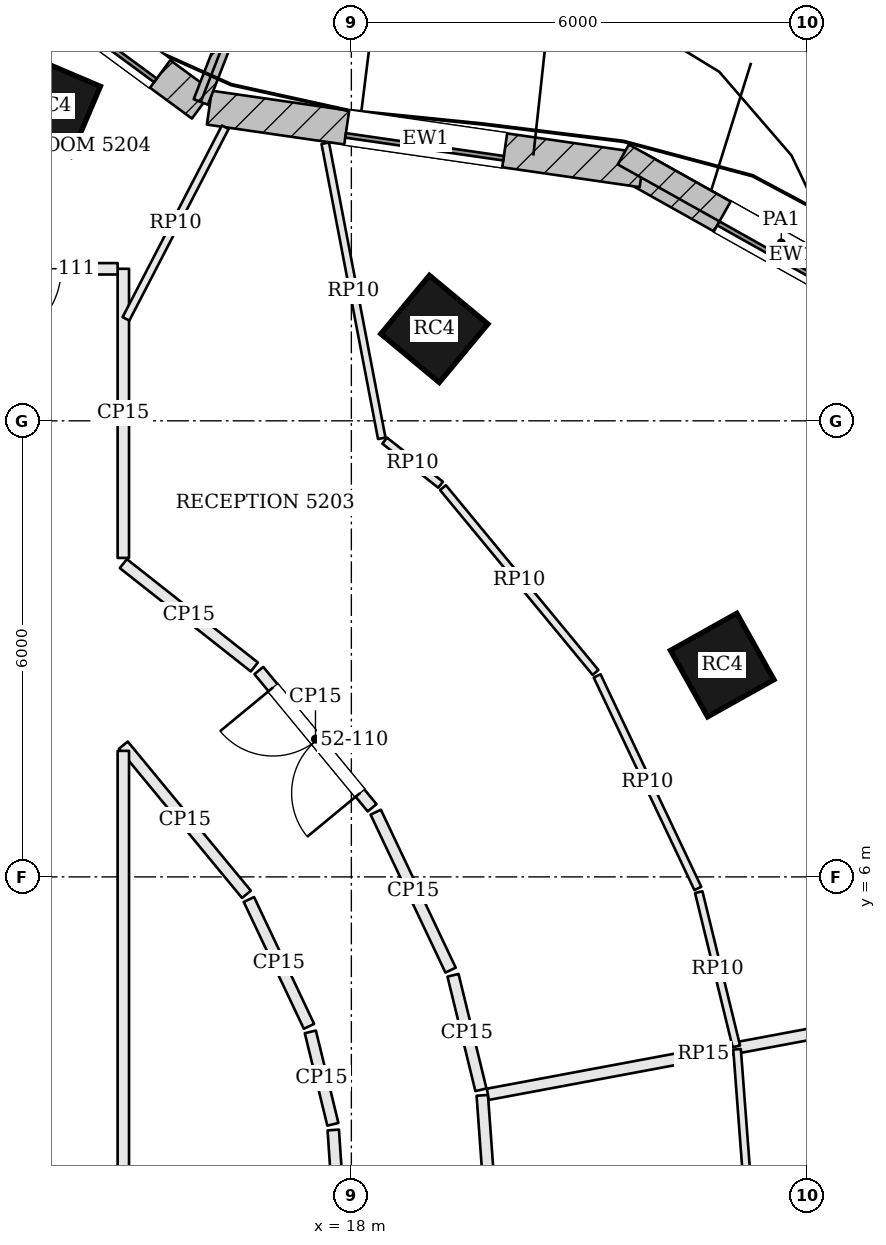
"""IFC4 building model, lengths in metres.
Left out: names, types, materials, properties, quantities, classifications, styles, units other than length and angle.
Written with IfcOpenShell. Run it as: python <this file> out.ifc"""

import sys

from ifc_helpers import new_model, si_unit, direction, frame, frame_2d, origin, origin_2d, place, context, subcontext, project, spatial, rectangle, extrude, element, fill, save


model = new_model("IFC4")
c1 = context("Model", 3, precision=1e-05, world=origin(), true_north=direction((0.0, 1.0)))
c2 = subcontext(c1, "Body", "Model", "MODEL_VIEW")
j1 = project(units=[si_unit("LENGTHUNIT", "METRE"), si_unit("PLANEANGLEUNIT", "RADIAN")], contexts=[c1])
p1 = place(None, origin())
s1 = spatial("IfcSite", under=j1, at=p1, CompositionType="ELEMENT")
p2 = place(p1, origin())
s2 = spatial("IfcBuilding", under=s1, at=p2, CompositionType="ELEMENT")
p3 = place(p2, frame((0.0, 0.0, 213.0)))
s3 = spatial("IfcBuildingStorey", under=s2, at=p3, CompositionType="ELEMENT", Elevation=213.0)
for number, where, z_axis, x_axis in (
    (1, (22.879, 8.787, 0.0), (0.0, 0.0, 1.0), (-0.489, 0.873, 0.0)),
    (2, (19.092, 13.209, 0.0), (0.0, 0.0, 1.0), (-0.769, 0.639, 0.0)),
    (3, (14.042, 16.136, 0.0), (0.0, 0.0, 1.0), (-0.92, 0.392, 0.0)),
):
    element("IfcColumn", number, at=place(p3, frame(where, z_axis=z_axis, x_axis=x_axis)), inside=s3, PredefinedType="COLUMN", context=c2, shape_type="SweptSolid", body=[
        extrude(rectangle(XDim=1.0, YDim=1.0, at=origin_2d()), origin(), (0.0, 0.0, 1.0), 3.9),
    ])
p4 = place(p3, frame((25.844, 13.028, 0.0), z_axis=(0.0, 0.0, 1.0), x_axis=(-0.872346398261, 0.488888291373, 0.0)))
e4 = element("IfcWall", 4, at=p4, inside=s3, PredefinedType="SOLIDWALL", context=c2, shape_type="SweptSolid", body=[
    extrude(rectangle(XDim=4.696, YDim=0.45, at=frame_2d((2.348, 0.0))), origin(), (0.0, 0.0, 1.0), 3.6),
])
p5 = place(p4, frame((1.298, 0.0, 0.9)))
e5 = element("IfcOpeningElement", 5, at=p5, cuts=e4, PredefinedType="OPENING", context=c2, shape_type="SweptSolid", body=[
    extrude(rectangle(XDim=2.1, YDim=1.8, at=frame_2d((1.05, 0.9))), frame((0.0, 0.235, 0.0), z_axis=(0.0, -1.0, 0.0), x_axis=(1.0, 0.0, 0.0)), (0.0, 0.0, 1.0), 0.47),
])
p6 = place(p3, frame((21.825, 15.297, 0.0), z_axis=(0.0, 0.0, 1.0), x_axis=(-0.98971474215, 0.143054986527, 0.0)))
e6 = element("IfcWall", 6, at=p6, inside=s3, PredefinedType="SOLIDWALL", context=c2, shape_type="SweptSolid", body=[
    extrude(rectangle(XDim=5.753, YDim=0.45, at=frame_2d((2.876, 0.0))), origin(), (0.0, 0.0, 1.0), 3.6),
])
p7 = place(p6, frame((1.826, 0.0, 0.9)))
e7 = element("IfcOpeningElement", 7, at=p7, cuts=e6, PredefinedType="OPENING", context=c2, shape_type="SweptSolid", body=[
    extrude(rectangle(XDim=2.1, YDim=1.8, at=frame_2d((1.05, 0.9))), frame((0.0, 0.235, 0.0), z_axis=(0.0, -1.0, 0.0), x_axis=(1.0, 0.0, 0.0)), (0.0, 0.0, 1.0), 0.47),
])
p8 = place(p3, frame((16.036, 16.158, 0.0), z_axis=(0.0, 0.0, 1.0), x_axis=(-0.805181432967, 0.593028549064, 0.0)))
e8 = element("IfcWall", 8, at=p8, inside=s3, PredefinedType="SOLIDWALL", context=c2, shape_type="SweptSolid", body=[
    extrude(rectangle(XDim=3.469, YDim=0.45, at=frame_2d((1.734, 0.0))), origin(), (0.0, 0.0, 1.0), 3.6),
])
p9 = place(p8, frame((0.684, 0.0, 0.9)))
e9 = element("IfcOpeningElement", 9, at=p9, cuts=e8, PredefinedType="OPENING", context=c2, shape_type="SweptSolid", body=[
    extrude(rectangle(XDim=2.1, YDim=1.8, at=frame_2d((1.05, 0.9))), frame((0.0, 0.235, 0.0), z_axis=(0.0, -1.0, 0.0), x_axis=(1.0, 0.0, 0.0)), (0.0, 0.0, 1.0), 0.47),
])
p10 = place(p3, frame((16.019, 16.195, 0.0), z_axis=(0.0, 0.0, 1.0), x_axis=(0.362641522028, 0.931928713208, 0.0)))
e10 = element("IfcWall", 10, at=p10, inside=s3, PredefinedType="SOLIDWALL", context=c2, shape_type="SweptSolid", body=[
    extrude(rectangle(XDim=1.75, YDim=0.2, at=frame_2d((0.875, 0.0))), origin(), (0.0, 0.0, 1.0), 3.6),
])
p11 = place(p3, frame((25.734, 13.176, 3.9), z_axis=(0.0, 0.0, 1.0), x_axis=(-0.872345142407, 0.488890532245, 0.0)))
e11 = element("IfcWall", 11, at=p11, inside=s3, PredefinedType="PARAPET", context=c2, shape_type="SweptSolid", body=[
    extrude(rectangle(XDim=4.763, YDim=0.3, at=frame_2d((2.381, 0.0))), origin(), (0.0, 0.0, 1.0), 1.1),
])
p12 = place(p3, frame((19.943, 0.075, 0.0), z_axis=(0.0, 0.0, 1.0), x_axis=(-0.072222486356, 0.997388546387, 0.0)))
e12 = element("IfcWall", 12, at=p12, inside=s3, PredefinedType="PARTITIONING", context=c2, shape_type="SweptSolid", body=[
    extrude(rectangle(XDim=3.059, YDim=0.15, at=frame_2d((1.53, 0.0))), origin(), (0.0, 0.0, 1.0), 2.984),
])
p13 = place(p3, frame((25.467, 4.199, 0.0), z_axis=(0.0, 0.0, 1.0), x_axis=(-0.983002736938, -0.183590901659, 0.0)))
e13 = element("IfcWall", 13, at=p13, inside=s3, PredefinedType="PARTITIONING", context=c2, shape_type="SweptSolid", body=[
    extrude(rectangle(XDim=5.769, YDim=0.15, at=frame_2d((2.884, 0.0))), origin(), (0.0, 0.0, 1.0), 3.084),
])
p14 = place(p3, frame((19.705, 3.199, 0.0), z_axis=(0.0, 0.0, 1.0), x_axis=(-0.23678945494, 0.971560988322, 0.0)))
e14 = element("IfcWall", 14, at=p14, inside=s3, PredefinedType="PARTITIONING", context=c2, shape_type="SweptSolid", body=[
    extrude(rectangle(XDim=1.551, YDim=0.15, at=frame_2d((0.775, 0.0))), origin(), (0.0, 0.0, 1.0), 2.984),
])
p15 = place(p3, frame((19.305, 4.773, 0.0), z_axis=(0.0, 0.0, 1.0), x_axis=(-0.428173054138, 0.903696760927, 0.0)))
e15 = element("IfcWall", 15, at=p15, inside=s3, PredefinedType="PARTITIONING", context=c2, shape_type="SweptSolid", body=[
    extrude(rectangle(XDim=2.3, YDim=0.15, at=frame_2d((1.15, 0.0))), origin(), (0.0, 0.0, 1.0), 2.984),
])
p16 = place(p3, frame((18.273, 6.909, 0.0), z_axis=(0.0, 0.0, 1.0), x_axis=(-0.63653648943, 0.771246586783, 0.0)))
e16 = element("IfcWall", 16, at=p16, inside=s3, PredefinedType="PARTITIONING", context=c2, shape_type="SweptSolid", body=[
    extrude(rectangle(XDim=2.342, YDim=0.15, at=frame_2d((1.171, 0.0))), origin(), (0.0, 0.0, 1.0), 2.984),
])
p17 = place(p16, frame((0.25, 0.0, 0.0)))
e17 = element("IfcOpeningElement", 17, at=p17, cuts=e16, PredefinedType="OPENING", context=c2, shape_type="SweptSolid", body=[
    extrude(rectangle(XDim=1.8, YDim=2.1, at=frame_2d((0.9, 1.05))), frame((0.0, 0.085, 0.0), z_axis=(0.0, -1.0, 0.0), x_axis=(1.0, 0.0, 0.0)), (0.0, 0.0, 1.0), 0.17),
])
p18 = place(p3, frame((16.724, 8.761, 0.0), z_axis=(0.0, 0.0, 1.0), x_axis=(-0.785124633057, 0.619337800047, 0.0)))
e18 = element("IfcWall", 18, at=p18, inside=s3, PredefinedType="PARTITIONING", context=c2, shape_type="SweptSolid", body=[
    extrude(rectangle(XDim=2.196, YDim=0.15, at=frame_2d((1.098, 0.0))), origin(), (0.0, 0.0, 1.0), 2.984),
])
p19 = place(p3, frame((15.0, 10.196, 0.0), z_axis=(0.0, 0.0, 1.0), x_axis=(0.0, 1.0, 0.0)))
e19 = element("IfcWall", 19, at=p19, inside=s3, PredefinedType="PARTITIONING", context=c2, shape_type="SweptSolid", body=[
    extrude(rectangle(XDim=3.804, YDim=0.15, at=frame_2d((1.902, 0.0))), origin(), (0.0, 0.0, 1.0), 2.984),
])
p20 = place(p3, frame((14.925, 14.0, 0.0), z_axis=(0.0, 0.0, 1.0), x_axis=(-1.0, 0.0, 0.0)))
e20 = element("IfcWall", 20, at=p20, inside=s3, PredefinedType="PARTITIONING", context=c2, shape_type="SweptSolid", body=[
    extrude(rectangle(XDim=29.925, YDim=0.15, at=frame_2d((14.962, 0.0))), origin(), (0.0, 0.0, 1.0), 2.984),
])
p21 = place(p20, frame((0.743, 0.0, 0.0)))
e21 = element("IfcOpeningElement", 21, at=p21, cuts=e20, PredefinedType="OPENING", context=c2, shape_type="SweptSolid", body=[
    extrude(rectangle(XDim=1.0, YDim=2.4, at=frame_2d((0.5, 1.2))), frame((0.0, 0.085, 0.0), z_axis=(0.0, -1.0, 0.0), x_axis=(1.0, 0.0, 0.0)), (0.0, 0.0, 1.0), 0.17),
])
p22 = place(p20, frame((6.984, 0.0, 0.0)))
e22 = element("IfcOpeningElement", 22, at=p22, cuts=e20, PredefinedType="OPENING", context=c2, shape_type="SweptSolid", body=[
    extrude(rectangle(XDim=1.0, YDim=2.4, at=frame_2d((0.5, 1.2))), frame((0.0, 0.085, 0.0), z_axis=(0.0, -1.0, 0.0), x_axis=(1.0, 0.0, 0.0)), (0.0, 0.0, 1.0), 0.17),
])
p23 = place(p20, frame((14.166, 0.0, 0.0)))
e23 = element("IfcOpeningElement", 23, at=p23, cuts=e20, PredefinedType="OPENING", context=c2, shape_type="SweptSolid", body=[
    extrude(rectangle(XDim=1.0, YDim=2.4, at=frame_2d((0.5, 1.2))), frame((0.0, 0.085, 0.0), z_axis=(0.0, -1.0, 0.0), x_axis=(1.0, 0.0, 0.0)), (0.0, 0.0, 1.0), 0.17),
])
p24 = place(p20, frame((20.45, 0.0, 0.0)))
e24 = element("IfcOpeningElement", 24, at=p24, cuts=e20, PredefinedType="OPENING", context=c2, shape_type="SweptSolid", body=[
    extrude(rectangle(XDim=1.0, YDim=2.1, at=frame_2d((0.5, 1.05))), frame((0.0, 0.085, 0.0), z_axis=(0.0, -1.0, 0.0), x_axis=(1.0, 0.0, 0.0)), (0.0, 0.0, 1.0), 0.17),
])
p25 = place(p20, frame((26.55, 0.0, 0.0)))
e25 = element("IfcOpeningElement", 25, at=p25, cuts=e20, PredefinedType="OPENING", context=c2, shape_type="SweptSolid", body=[
    extrude(rectangle(XDim=1.0, YDim=2.1, at=frame_2d((0.5, 1.05))), frame((0.0, 0.085, 0.0), z_axis=(0.0, -1.0, 0.0), x_axis=(1.0, 0.0, 0.0)), (0.0, 0.0, 1.0), 0.17),
])
p26 = place(p3, frame((15.0, 7.733, 0.0), z_axis=(0.0, 0.0, 1.0), x_axis=(0.636601263488, -0.771193121938, 0.0)))
e26 = element("IfcWall", 26, at=p26, inside=s3, PredefinedType="PARTITIONING", context=c2, shape_type="SweptSolid", body=[
    extrude(rectangle(XDim=2.545, YDim=0.15, at=frame_2d((1.272, 0.0))), origin(), (0.0, 0.0, 1.0), 2.984),
])
p27 = place(p3, frame((16.652, 5.702, 0.0), z_axis=(0.0, 0.0, 1.0), x_axis=(0.428126129773, -0.903718992279, 0.0)))
e27 = element("IfcWall", 27, at=p27, inside=s3, PredefinedType="PARTITIONING", context=c2, shape_type="SweptSolid", body=[
    extrude(rectangle(XDim=1.846, YDim=0.15, at=frame_2d((0.923, 0.0))), origin(), (0.0, 0.0, 1.0), 2.984),
])
p28 = place(p3, frame((17.46, 3.961, 0.0), z_axis=(0.0, 0.0, 1.0), x_axis=(0.236655249498, -0.971593687137, 0.0)))
e28 = element("IfcWall", 28, at=p28, inside=s3, PredefinedType="PARTITIONING", context=c2, shape_type="SweptSolid", body=[
    extrude(rectangle(XDim=1.251, YDim=0.15, at=frame_2d((0.626, 0.0))), origin(), (0.0, 0.0, 1.0), 2.984),
])
p29 = place(p3, frame((17.762, 2.67, 0.0), z_axis=(0.0, 0.0, 1.0), x_axis=(0.068135311644, -0.997676089373, 0.0)))
e29 = element("IfcWall", 29, at=p29, inside=s3, PredefinedType="PARTITIONING", context=c2, shape_type="SweptSolid", body=[
    extrude(rectangle(XDim=2.677, YDim=0.15, at=frame_2d((1.338, 0.0))), origin(), (0.0, 0.0, 1.0), 2.984),
])
p30 = place(p3, frame((15.0, -4.925, 0.0), z_axis=(0.0, 0.0, 1.0), x_axis=(0.0, 1.0, 0.0)))
e30 = element("IfcWall", 30, at=p30, inside=s3, PredefinedType="PARTITIONING", context=c2, shape_type="SweptSolid", body=[
    extrude(rectangle(XDim=12.583, YDim=0.15, at=frame_2d((6.292, 0.0))), origin(), (0.0, 0.0, 1.0), 2.984),
])
p31 = place(p30, frame((5.791, 0.0, 0.0)))
e31 = element("IfcOpeningElement", 31, at=p31, cuts=e30, PredefinedType="OPENING", context=c2, shape_type="SweptSolid", body=[
    extrude(rectangle(XDim=1.0, YDim=2.1, at=frame_2d((0.5, 1.05))), frame((0.0, 0.085, 0.0), z_axis=(0.0, -1.0, 0.0), x_axis=(1.0, 0.0, 0.0)), (0.0, 0.0, 1.0), 0.17),
])
p32 = place(p3, frame((23.074, 3.732, 0.0), z_axis=(0.0, 0.0, 1.0), x_axis=(0.075479196263, -0.997147376736, 0.0)))
e32 = element("IfcWall", 32, at=p32, inside=s3, PredefinedType="PARTITIONING", context=c2, shape_type="SweptSolid", body=[
    extrude(rectangle(XDim=3.742, YDim=0.1, at=frame_2d((1.871, 0.0))), origin(), (0.0, 0.0, 1.0), 2.984),
])
p33 = place(p3, frame((17.656, 15.652, 0.0), z_axis=(0.0, 0.0, 1.0), x_axis=(0.188068467909, -0.982155920095, 0.0)))
e33 = element("IfcWall", 33, at=p33, inside=s3, PredefinedType="PARTITIONING", context=c2, shape_type="SweptSolid", body=[
    extrude(rectangle(XDim=3.953, YDim=0.1, at=frame_2d((1.977, 0.0))), origin(), (0.0, 0.0, 1.0), 2.984),
])
p34 = place(p3, frame((18.439, 11.739, 0.0), z_axis=(0.0, 0.0, 1.0), x_axis=(0.784976275707, -0.619525823979, 0.0)))
e34 = element("IfcWall", 34, at=p34, inside=s3, PredefinedType="PARTITIONING", context=c2, shape_type="SweptSolid", body=[
    extrude(rectangle(XDim=0.936, YDim=0.1, at=frame_2d((0.468, 0.0))), origin(), (0.0, 0.0, 1.0), 2.984),
])
p35 = place(p3, frame((19.206, 11.121, 0.0), z_axis=(0.0, 0.0, 1.0), x_axis=(0.636597206989, -0.771196470462, 0.0)))
e35 = element("IfcWall", 35, at=p35, inside=s3, PredefinedType="PARTITIONING", context=c2, shape_type="SweptSolid", body=[
    extrude(rectangle(XDim=3.152, YDim=0.1, at=frame_2d((1.576, 0.0))), origin(), (0.0, 0.0, 1.0), 2.984),
])
p36 = place(p3, frame((21.234, 8.644, 0.0), z_axis=(0.0, 0.0, 1.0), x_axis=(0.428147386965, -0.903708921631, 0.0)))
e36 = element("IfcWall", 36, at=p36, inside=s3, PredefinedType="PARTITIONING", context=c2, shape_type="SweptSolid", body=[
    extrude(rectangle(XDim=3.095, YDim=0.1, at=frame_2d((1.547, 0.0))), origin(), (0.0, 0.0, 1.0), 2.984),
])
p37 = place(p3, frame((22.57, 5.799, 0.0), z_axis=(0.0, 0.0, 1.0), x_axis=(0.236808111838, -0.971556441061, 0.0)))
e37 = element("IfcWall", 37, at=p37, inside=s3, PredefinedType="PARTITIONING", context=c2, shape_type="SweptSolid", body=[
    extrude(rectangle(XDim=2.088, YDim=0.1, at=frame_2d((1.044, 0.0))), origin(), (0.0, 0.0, 1.0), 2.984),
])
p38 = place(p3, frame((15.034, 13.341, 0.0), z_axis=(0.0, 0.0, 1.0), x_axis=(0.460131451108, 0.887850802614, 0.0)))
e38 = element("IfcWall", 38, at=p38, inside=s3, PredefinedType="PARTITIONING", context=c2, shape_type="SweptSolid", body=[
    extrude(rectangle(XDim=2.84, YDim=0.1, at=frame_2d((1.42, 0.0))), origin(), (0.0, 0.0, 1.0), 2.984),
])
p39 = place(p5, origin())
e39 = element("IfcWindow", 39, at=p39, inside=s3, PartitioningType="SINGLE_PANEL", PredefinedType="WINDOW", context=c2, shape_type="SweptSolid", body=[
    extrude(rectangle(XDim=2.1, YDim=1.8, at=frame_2d((1.05, 0.9))), frame((0.0, 0.135, 0.0), z_axis=(0.0, -1.0, 0.0), x_axis=(1.0, 0.0, 0.0)), (0.0, 0.0, 1.0), 0.06),
])
fill(e5, e39)
p40 = place(p7, origin())
e40 = element("IfcWindow", 40, at=p40, inside=s3, PartitioningType="SINGLE_PANEL", PredefinedType="WINDOW", context=c2, shape_type="SweptSolid", body=[
    extrude(rectangle(XDim=2.1, YDim=1.8, at=frame_2d((1.05, 0.9))), frame((0.0, 0.135, 0.0), z_axis=(0.0, -1.0, 0.0), x_axis=(1.0, 0.0, 0.0)), (0.0, 0.0, 1.0), 0.06),
])
fill(e7, e40)
p41 = place(p9, origin())
e41 = element("IfcWindow", 41, at=p41, inside=s3, PartitioningType="SINGLE_PANEL", PredefinedType="WINDOW", context=c2, shape_type="SweptSolid", body=[
    extrude(rectangle(XDim=2.1, YDim=1.8, at=frame_2d((1.05, 0.9))), frame((0.0, 0.135, 0.0), z_axis=(0.0, -1.0, 0.0), x_axis=(1.0, 0.0, 0.0)), (0.0, 0.0, 1.0), 0.06),
])
fill(e9, e41)
p42 = place(p17, origin())
e42 = element("IfcDoor", 42, at=p42, inside=s3, OperationType="DOUBLE_DOOR_SINGLE_SWING", PredefinedType="DOOR", context=c2, shape_type="SweptSolid", body=[
    extrude(rectangle(XDim=1.8, YDim=2.1, at=frame_2d((0.9, 1.05))), frame((0.0, 0.025, 0.0), z_axis=(0.0, -1.0, 0.0), x_axis=(1.0, 0.0, 0.0)), (0.0, 0.0, 1.0), 0.05),
])
fill(e17, e42)
p43 = place(p21, origin())
e43 = element("IfcDoor", 43, at=p43, inside=s3, OperationType="SINGLE_SWING_RIGHT", PredefinedType="DOOR", context=c2, shape_type="SweptSolid", body=[
    extrude(rectangle(XDim=1.0, YDim=2.4, at=frame_2d((0.5, 1.2))), frame((0.0, 0.025, 0.0), z_axis=(0.0, -1.0, 0.0), x_axis=(1.0, 0.0, 0.0)), (0.0, 0.0, 1.0), 0.05),
])
fill(e21, e43)
save(model, sys.argv[1])
